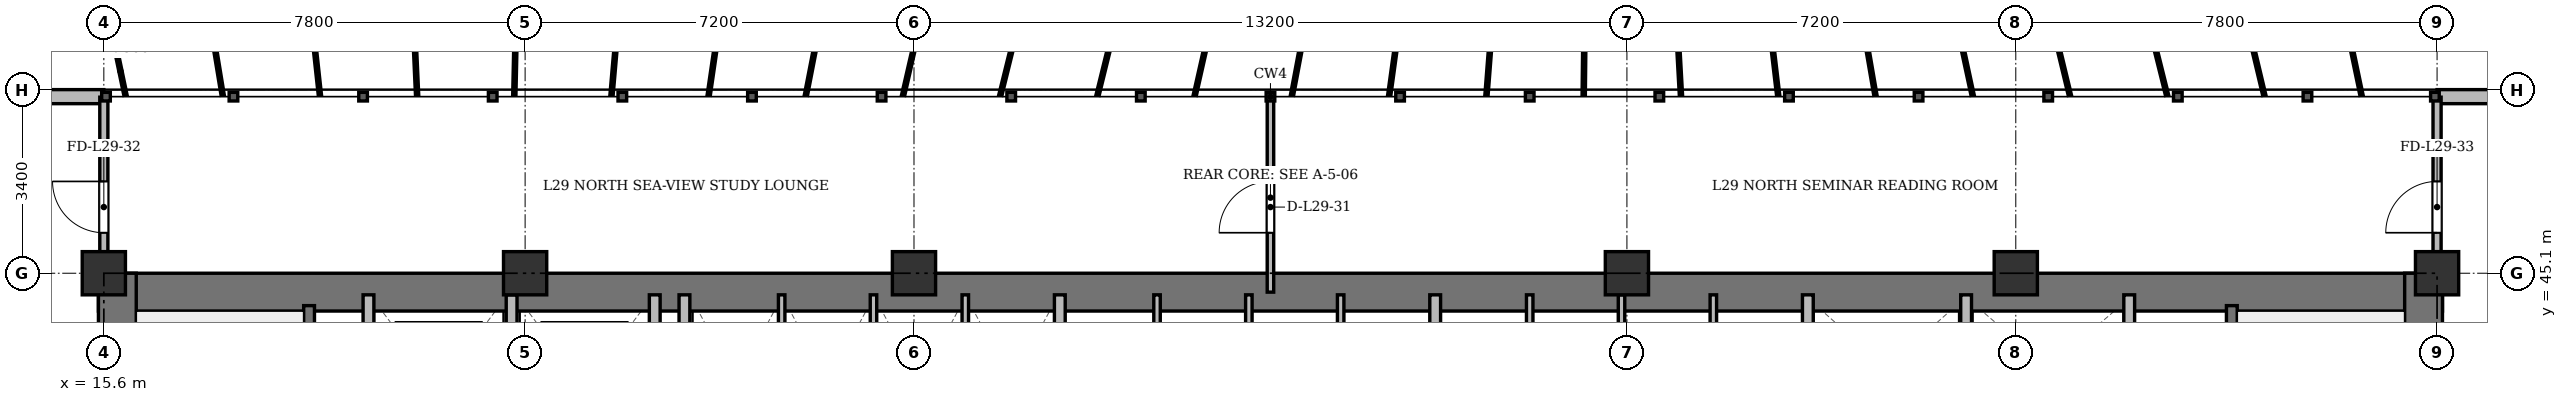
"""IFC4 building model, lengths in metres.
Left out: names, types, materials, properties, quantities, classifications, styles, units other than length and angle.
Written with IfcOpenShell. Run it as: python <this file> out.ifc"""

import sys

from ifc_helpers import new_model, si_unit, direction, frame, frame_2d, origin, origin_2d, place, context, subcontext, project, spatial, rectangle, extrude, source, transform, mapped, element, fill, save


model = new_model("IFC4")
c1 = context("Model", 3, precision=1e-05, world=origin(), true_north=direction((0.0, 1.0)))
c2 = subcontext(c1, "Body", "Model", "MODEL_VIEW")
j1 = project(units=[si_unit("LENGTHUNIT", "METRE"), si_unit("PLANEANGLEUNIT", "RADIAN")], contexts=[c1])
p1 = place(None, origin())
s1 = spatial("IfcSite", under=j1, at=p1, CompositionType="ELEMENT")
p2 = place(p1, origin())
s2 = spatial("IfcBuilding", under=s1, at=p2, CompositionType="ELEMENT")
p3 = place(p2, frame((0.0, 0.0, 114.1)))
s3 = spatial("IfcBuildingStorey", under=s2, at=p3, CompositionType="ELEMENT", Elevation=114.1)
m1 = source(origin(), c2, "Body", "SweptSolid", [
    extrude(rectangle(XDim=0.8, YDim=0.8, at=origin_2d()), origin(), (0.0, 0.0, 1.0), 3.6),
])
for number, where, z_axis, x_axis in (
    (1, (15.6, 45.1, 0.0), (0.0, 0.0, 1.0), (1.0, 0.0, 0.0)),
    (2, (23.4, 45.1, 0.0), (0.0, 0.0, 1.0), (1.0, 0.0, 0.0)),
    (3, (30.6, 45.1, 0.0), (0.0, 0.0, 1.0), (1.0, 0.0, 0.0)),
    (4, (43.8, 45.1, 0.0), (0.0, 0.0, 1.0), (1.0, 0.0, 0.0)),
    (5, (51.0, 45.1, 0.0), (0.0, 0.0, 1.0), (1.0, 0.0, 0.0)),
    (6, (58.8, 45.1, 0.0), (0.0, 0.0, 1.0), (1.0, 0.0, 0.0)),
):
    element("IfcColumn", number, at=place(p3, frame(where, z_axis=z_axis, x_axis=x_axis)), inside=s3, PredefinedType="COLUMN", context=c2, shape_type="MappedRepresentation", body=[
        mapped(m1, transform((0.0, 0.0, 0.0), x_axis=(1.0, 0.0, 0.0), y_axis=(0.0, 1.0, 0.0), z_axis=(0.0, 0.0, 1.0), scale=1.0)),
    ])
p4 = place(p3, frame((7.6, 48.37, 0.0), z_axis=(0.0, 0.0, 1.0), x_axis=(1.0, 0.0, 0.0)))
e7 = element("IfcWall", 7, at=p4, inside=s3, PredefinedType="SOLIDWALL", context=c2, shape_type="SweptSolid", body=[
    extrude(rectangle(XDim=8.0, YDim=0.26, at=frame_2d((4.0, 0.0))), origin(), (0.0, 0.0, 1.0), 3.34),
])
p5 = place(p4, frame((0.768, 0.0, 0.9)))
e8 = element("IfcOpeningElement", 8, at=p5, cuts=e7, PredefinedType="OPENING", context=c2, shape_type="SweptSolid", body=[
    extrude(rectangle(XDim=1.2, YDim=1.65, at=frame_2d((0.6, 0.825))), frame((0.0, 0.14, 0.0), z_axis=(0.0, -1.0, 0.0), x_axis=(1.0, 0.0, 0.0)), (0.0, 0.0, 1.0), 0.28),
])
p6 = place(p4, frame((4.441, 0.0, 0.9)))
e9 = element("IfcOpeningElement", 9, at=p6, cuts=e7, PredefinedType="OPENING", context=c2, shape_type="SweptSolid", body=[
    extrude(rectangle(XDim=1.35, YDim=1.5, at=frame_2d((0.675, 0.75))), frame((0.0, 0.14, 0.0), z_axis=(0.0, -1.0, 0.0), x_axis=(1.0, 0.0, 0.0)), (0.0, 0.0, 1.0), 0.28),
])
p7 = place(p3, frame((58.8, 48.37, 0.0), z_axis=(0.0, 0.0, 1.0), x_axis=(1.0, 0.0, 0.0)))
e10 = element("IfcWall", 10, at=p7, inside=s3, PredefinedType="SOLIDWALL", context=c2, shape_type="SweptSolid", body=[
    extrude(rectangle(XDim=8.0, YDim=0.26, at=frame_2d((4.0, 0.0))), origin(), (0.0, 0.0, 1.0), 3.34),
])
p8 = place(p7, frame((2.209, 0.0, 0.9)))
e11 = element("IfcOpeningElement", 11, at=p8, cuts=e10, PredefinedType="OPENING", context=c2, shape_type="SweptSolid", body=[
    extrude(rectangle(XDim=1.35, YDim=1.5, at=frame_2d((0.675, 0.75))), frame((0.0, 0.14, 0.0), z_axis=(0.0, -1.0, 0.0), x_axis=(1.0, 0.0, 0.0)), (0.0, 0.0, 1.0), 0.28),
])
p9 = place(p7, frame((6.033, 0.0, 0.9)))
e12 = element("IfcOpeningElement", 12, at=p9, cuts=e10, PredefinedType="OPENING", context=c2, shape_type="SweptSolid", body=[
    extrude(rectangle(XDim=1.2, YDim=1.65, at=frame_2d((0.6, 0.825))), frame((0.0, 0.14, 0.0), z_axis=(0.0, -1.0, 0.0), x_axis=(1.0, 0.0, 0.0)), (0.0, 0.0, 1.0), 0.28),
])
p10 = place(p3, frame((15.5, 44.75, 0.0), z_axis=(0.0, 0.0, 1.0), x_axis=(1.0, 0.0, 0.0)))
e13 = element("IfcWall", 13, at=p10, inside=s3, PredefinedType="SHEAR", context=c2, shape_type="SweptSolid", body=[
    extrude(rectangle(XDim=43.4, YDim=0.7, at=frame_2d((21.7, 0.0))), origin(), (0.0, 0.0, 1.0), 3.34),
])
for number, where, z_axis, x_axis in (
    (14, (15.85, 33.4, 0.0), (0.0, 0.0, 1.0), (0.0, 1.0, 0.0)),
    (15, (58.55, 33.4, 0.0), (0.0, 0.0, 1.0), (0.0, 1.0, 0.0)),
):
    element("IfcWall", number, at=place(p3, frame(where, z_axis=z_axis, x_axis=x_axis)), inside=s3, PredefinedType="SHEAR", context=c2, shape_type="SweptSolid", body=[
        extrude(rectangle(XDim=11.7, YDim=0.7, at=frame_2d((5.85, 0.0))), origin(), (0.0, 0.0, 1.0), 3.34),
    ])
p11 = place(p3, frame((19.4, 33.4, 0.0), z_axis=(0.0, 0.0, 1.0), x_axis=(0.0, 1.0, 0.0)))
e16 = element("IfcWall", 16, at=p11, inside=s3, PredefinedType="SHEAR", context=c2, shape_type="SweptSolid", body=[
    extrude(rectangle(XDim=11.1, YDim=0.2, at=frame_2d((5.55, 0.0))), origin(), (0.0, 0.0, 1.0), 3.34),
])
p12 = place(p11, frame((0.85, 0.0, 0.0)))
e17 = element("IfcOpeningElement", 17, at=p12, cuts=e16, PredefinedType="OPENING", context=c2, shape_type="SweptSolid", body=[
    extrude(rectangle(XDim=1.1, YDim=2.15, at=frame_2d((0.55, 1.075))), frame((0.0, 0.11, 0.0), z_axis=(0.0, -1.0, 0.0), x_axis=(1.0, 0.0, 0.0)), (0.0, 0.0, 1.0), 0.22),
])
p13 = place(p3, frame((55.0, 33.4, 0.0), z_axis=(0.0, 0.0, 1.0), x_axis=(0.0, 1.0, 0.0)))
e18 = element("IfcWall", 18, at=p13, inside=s3, PredefinedType="SHEAR", context=c2, shape_type="SweptSolid", body=[
    extrude(rectangle(XDim=11.1, YDim=0.2, at=frame_2d((5.55, 0.0))), origin(), (0.0, 0.0, 1.0), 3.34),
])
p14 = place(p13, frame((0.85, 0.0, 0.0)))
e19 = element("IfcOpeningElement", 19, at=p14, cuts=e18, PredefinedType="OPENING", context=c2, shape_type="SweptSolid", body=[
    extrude(rectangle(XDim=1.1, YDim=2.15, at=frame_2d((0.55, 1.075))), frame((0.0, 0.11, 0.0), z_axis=(0.0, -1.0, 0.0), x_axis=(1.0, 0.0, 0.0)), (0.0, 0.0, 1.0), 0.22),
])
for number, where, z_axis, x_axis in (
    (20, (20.5, 41.3, 0.0), (0.0, 0.0, 1.0), (0.0, 1.0, 0.0)),
    (21, (23.15, 41.3, 0.0), (0.0, 0.0, 1.0), (0.0, 1.0, 0.0)),
    (22, (25.8, 41.3, 0.0), (0.0, 0.0, 1.0), (0.0, 1.0, 0.0)),
):
    element("IfcWall", number, at=place(p3, frame(where, z_axis=z_axis, x_axis=x_axis)), inside=s3, PredefinedType="SOLIDWALL", context=c2, shape_type="SweptSolid", body=[
        extrude(rectangle(XDim=3.4, YDim=0.2, at=frame_2d((1.7, 0.0))), origin(), (0.0, 0.0, 1.0), 3.34),
    ])
p15 = place(p3, frame((26.35, 33.4, 0.0), z_axis=(0.0, 0.0, 1.0), x_axis=(0.0, 1.0, 0.0)))
e23 = element("IfcWall", 23, at=p15, inside=s3, PredefinedType="SOLIDWALL", context=c2, shape_type="SweptSolid", body=[
    extrude(rectangle(XDim=11.3, YDim=0.2, at=frame_2d((5.65, 0.0))), origin(), (0.0, 0.0, 1.0), 2.752),
])
p16 = place(p3, frame((33.3, 41.5, 0.0), z_axis=(0.0, 0.0, 1.0), x_axis=(0.0, 1.0, 0.0)))
e24 = element("IfcWall", 24, at=p16, inside=s3, PredefinedType="SOLIDWALL", context=c2, shape_type="SweptSolid", body=[
    extrude(rectangle(XDim=3.2, YDim=0.2, at=frame_2d((1.6, 0.0))), origin(), (0.0, 0.0, 1.0), 3.34),
])
for number, where, z_axis, x_axis in (
    (25, (28.15, 41.5, 0.0), (0.0, 0.0, 1.0), (0.0, 1.0, 0.0)),
    (26, (29.85, 41.5, 0.0), (0.0, 0.0, 1.0), (0.0, 1.0, 0.0)),
    (27, (31.55, 41.5, 0.0), (0.0, 0.0, 1.0), (0.0, 1.0, 0.0)),
    (28, (35.1, 41.5, 0.0), (0.0, 0.0, 1.0), (0.0, 1.0, 0.0)),
    (29, (36.8, 41.5, 0.0), (0.0, 0.0, 1.0), (0.0, 1.0, 0.0)),
    (30, (38.5, 41.5, 0.0), (0.0, 0.0, 1.0), (0.0, 1.0, 0.0)),
):
    element("IfcWall", number, at=place(p3, frame(where, z_axis=z_axis, x_axis=x_axis)), inside=s3, PredefinedType="PARTITIONING", context=c2, shape_type="SweptSolid", body=[
        extrude(rectangle(XDim=3.2, YDim=0.12, at=frame_2d((1.6, 0.0))), origin(), (0.0, 0.0, 1.0), 3.34),
    ])
p17 = place(p3, frame((40.25, 41.5, 0.0), z_axis=(0.0, 0.0, 1.0), x_axis=(0.0, 1.0, 0.0)))
e31 = element("IfcWall", 31, at=p17, inside=s3, PredefinedType="SOLIDWALL", context=c2, shape_type="SweptSolid", body=[
    extrude(rectangle(XDim=3.2, YDim=0.2, at=frame_2d((1.6, 0.0))), origin(), (0.0, 0.0, 1.0), 3.34),
])
p18 = place(p3, frame((42.0, 41.5, 0.0), z_axis=(0.0, 0.0, 1.0), x_axis=(0.0, 1.0, 0.0)))
e32 = element("IfcWall", 32, at=p18, inside=s3, PredefinedType="PARTITIONING", context=c2, shape_type="SweptSolid", body=[
    extrude(rectangle(XDim=3.2, YDim=0.12, at=frame_2d((1.6, 0.0))), origin(), (0.0, 0.0, 1.0), 3.34),
])
p19 = place(p3, frame((43.7, 41.5, 0.0), z_axis=(0.0, 0.0, 1.0), x_axis=(0.0, 1.0, 0.0)))
e33 = element("IfcWall", 33, at=p19, inside=s3, PredefinedType="PARTITIONING", context=c2, shape_type="SweptSolid", body=[
    extrude(rectangle(XDim=3.2, YDim=0.12, at=frame_2d((1.6, 0.0))), origin(), (0.0, 0.0, 1.0), 2.84),
])
p20 = place(p3, frame((45.4, 41.5, 0.0), z_axis=(0.0, 0.0, 1.0), x_axis=(0.0, 1.0, 0.0)))
e34 = element("IfcWall", 34, at=p20, inside=s3, PredefinedType="PARTITIONING", context=c2, shape_type="SweptSolid", body=[
    extrude(rectangle(XDim=3.2, YDim=0.12, at=frame_2d((1.6, 0.0))), origin(), (0.0, 0.0, 1.0), 3.34),
])
p21 = place(p3, frame((47.15, 33.4, 0.0), z_axis=(0.0, 0.0, 1.0), x_axis=(0.0, 1.0, 0.0)))
e35 = element("IfcWall", 35, at=p21, inside=s3, PredefinedType="SOLIDWALL", context=c2, shape_type="SweptSolid", body=[
    extrude(rectangle(XDim=11.3, YDim=0.2, at=frame_2d((5.65, 0.0))), origin(), (0.0, 0.0, 1.0), 2.752),
])
for number, where, z_axis, x_axis in (
    (36, (50.08, 42.05, 0.0), (0.0, 0.0, 1.0), (0.0, 1.0, 0.0)),
    (37, (53.1, 42.05, 0.0), (0.0, 0.0, 1.0), (0.0, 1.0, 0.0)),
):
    element("IfcWall", number, at=place(p3, frame(where, z_axis=z_axis, x_axis=x_axis)), inside=s3, PredefinedType="SOLIDWALL", context=c2, shape_type="SweptSolid", body=[
        extrude(rectangle(XDim=2.65, YDim=0.2, at=frame_2d((1.325, 0.0))), origin(), (0.0, 0.0, 1.0), 3.34),
    ])
p22 = place(p3, frame((37.2, 44.75, 0.0), z_axis=(0.0, 0.0, 1.0), x_axis=(0.0, 1.0, 0.0)))
e38 = element("IfcWall", 38, at=p22, inside=s3, PredefinedType="PARTITIONING", context=c2, shape_type="SweptSolid", body=[
    extrude(rectangle(XDim=3.61, YDim=0.12, at=frame_2d((1.805, 0.0))), origin(), (0.0, 0.0, 1.0), 2.752),
])
p23 = place(p22, frame((1.1, 0.0, 0.0)))
e39 = element("IfcOpeningElement", 39, at=p23, cuts=e38, PredefinedType="OPENING", context=c2, shape_type="SweptSolid", body=[
    extrude(rectangle(XDim=0.95, YDim=2.15, at=frame_2d((0.475, 1.075))), frame((0.0, 0.07, 0.0), z_axis=(0.0, -1.0, 0.0), x_axis=(1.0, 0.0, 0.0)), (0.0, 0.0, 1.0), 0.14),
])
p24 = place(p3, frame((15.6, 44.75, 0.0), z_axis=(0.0, 0.0, 1.0), x_axis=(0.0, 1.0, 0.0)))
e40 = element("IfcWall", 40, at=p24, inside=s3, PredefinedType="PARTITIONING", context=c2, shape_type="SweptSolid", body=[
    extrude(rectangle(XDim=3.61, YDim=0.15, at=frame_2d((1.805, 0.0))), origin(), (0.0, 0.0, 1.0), 2.84),
])
p25 = place(p24, frame((1.1, 0.0, 0.0)))
e41 = element("IfcOpeningElement", 41, at=p25, cuts=e40, PredefinedType="OPENING", context=c2, shape_type="SweptSolid", body=[
    extrude(rectangle(XDim=0.95, YDim=2.15, at=frame_2d((0.475, 1.075))), frame((0.0, 0.085, 0.0), z_axis=(0.0, -1.0, 0.0), x_axis=(1.0, 0.0, 0.0)), (0.0, 0.0, 1.0), 0.17),
])
p26 = place(p3, frame((58.8, 44.75, 0.0), z_axis=(0.0, 0.0, 1.0), x_axis=(0.0, 1.0, 0.0)))
e42 = element("IfcWall", 42, at=p26, inside=s3, PredefinedType="PARTITIONING", context=c2, shape_type="SweptSolid", body=[
    extrude(rectangle(XDim=3.61, YDim=0.15, at=frame_2d((1.805, 0.0))), origin(), (0.0, 0.0, 1.0), 2.84),
])
p27 = place(p26, frame((1.1, 0.0, 0.0)))
e43 = element("IfcOpeningElement", 43, at=p27, cuts=e42, PredefinedType="OPENING", context=c2, shape_type="SweptSolid", body=[
    extrude(rectangle(XDim=0.95, YDim=2.15, at=frame_2d((0.475, 1.075))), frame((0.0, 0.085, 0.0), z_axis=(0.0, -1.0, 0.0), x_axis=(1.0, 0.0, 0.0)), (0.0, 0.0, 1.0), 0.17),
])
m2 = source(origin(), c2, "Body", "SweptSolid", [
    extrude(rectangle(XDim=0.95, YDim=2.15, at=frame_2d((0.475, 1.075))), frame((0.0, 0.025, 0.0), z_axis=(0.0, -1.0, 0.0), x_axis=(1.0, 0.0, 0.0)), (0.0, 0.0, 1.0), 0.05),
])
p28 = place(p23, origin())
e44 = element("IfcDoor", 44, at=p28, inside=s3, OperationType="SINGLE_SWING_LEFT", PredefinedType="DOOR", context=c2, shape_type="MappedRepresentation", body=[
    mapped(m2, transform((0.0, 0.0, 0.0), x_axis=(1.0, 0.0, 0.0), y_axis=(0.0, 1.0, 0.0), z_axis=(0.0, 0.0, 1.0), scale=1.0)),
])
fill(e39, e44)
p29 = place(p25, origin())
e45 = element("IfcDoor", 45, at=p29, inside=s3, OperationType="SINGLE_SWING_RIGHT", PredefinedType="DOOR", context=c2, shape_type="MappedRepresentation", body=[
    mapped(m2, transform((0.0, 0.0, 0.0), x_axis=(1.0, 0.0, 0.0), y_axis=(0.0, 1.0, 0.0), z_axis=(0.0, 0.0, 1.0), scale=1.0)),
])
fill(e41, e45)
p30 = place(p27, origin())
e46 = element("IfcDoor", 46, at=p30, inside=s3, OperationType="SINGLE_SWING_LEFT", PredefinedType="DOOR", context=c2, shape_type="MappedRepresentation", body=[
    mapped(m2, transform((0.0, 0.0, 0.0), x_axis=(1.0, 0.0, 0.0), y_axis=(0.0, 1.0, 0.0), z_axis=(0.0, 0.0, 1.0), scale=1.0)),
])
fill(e43, e46)
save(model, sys.argv[1])
